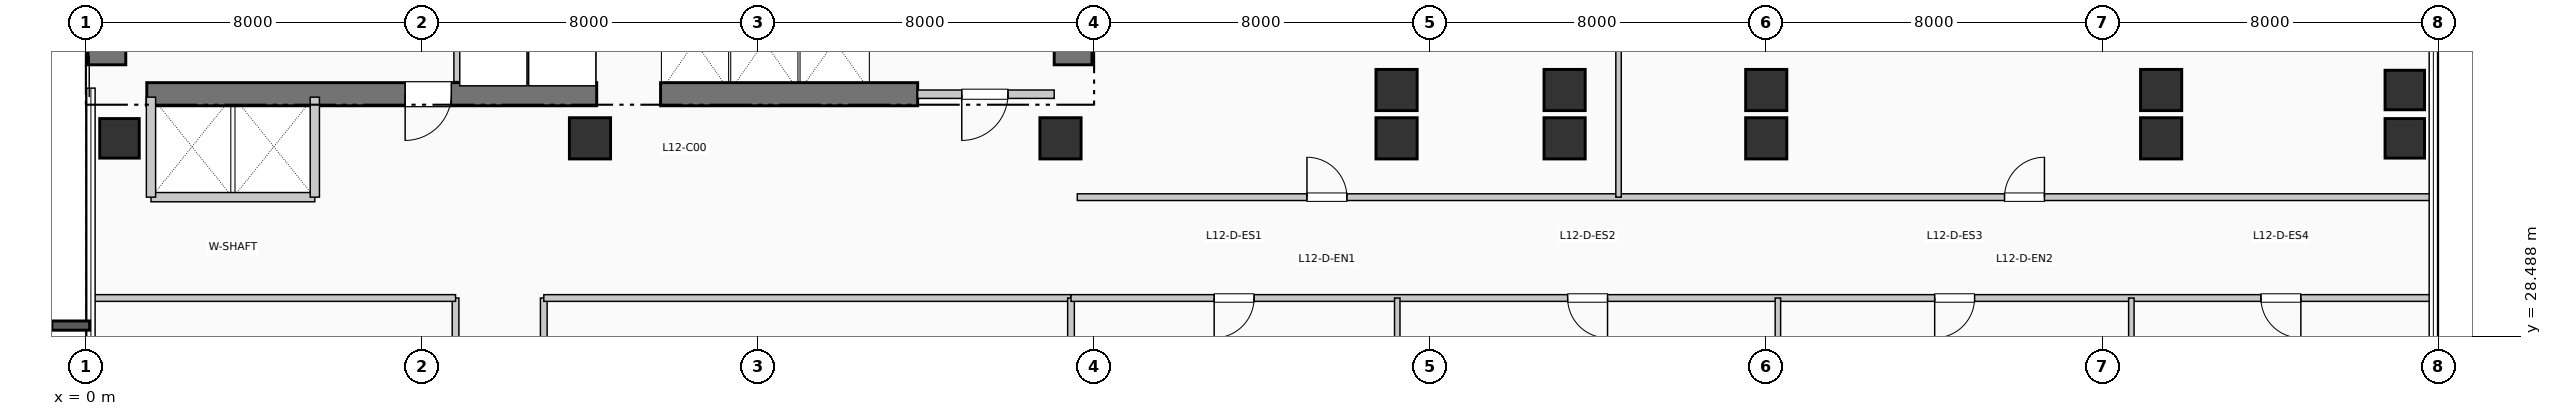
"""IFC4 building model, lengths in metres.
Left out: names, types, materials, properties, quantities, classifications, styles, units other than length and angle.
Written with IfcOpenShell. Run it as: python <this file> out.ifc"""

import sys

from ifc_helpers import new_model, si_unit, direction, frame, frame_2d, origin, origin_2d, place, context, subcontext, project, spatial, rectangle, extrude, element, fill, save


model = new_model("IFC4")
c1 = context("Model", 3, precision=1e-05, world=origin(), true_north=direction((0.0, 1.0)))
c2 = subcontext(c1, "Body", "Model", "MODEL_VIEW")
j1 = project(units=[si_unit("LENGTHUNIT", "METRE"), si_unit("PLANEANGLEUNIT", "RADIAN")], contexts=[c1])
p1 = place(None, origin())
s1 = spatial("IfcSite", under=j1, at=p1, CompositionType="ELEMENT")
p2 = place(p1, origin())
s2 = spatial("IfcBuilding", under=s1, at=p2, CompositionType="ELEMENT")
p3 = place(p2, frame((0.0, 0.0, 54.12)))
s3 = spatial("IfcBuildingStorey", under=s2, at=p3, CompositionType="ELEMENT", Elevation=54.12)
p4 = place(p3, frame((0.5, 34.95, 0.0), z_axis=(0.0, 0.0, 1.0), x_axis=(0.0, 1.0, 0.0)))
e1 = element("IfcWall", 1, at=p4, inside=s3, PredefinedType="SHEAR", context=c2, shape_type="SweptSolid", body=[
    extrude(rectangle(XDim=7.9, YDim=0.9, at=frame_2d((3.95, 0.0))), origin(), (0.0, 0.0, 1.0), 3.96),
])
p5 = place(p3, frame((23.5, 34.95, 0.0), z_axis=(0.0, 0.0, 1.0), x_axis=(0.0, 1.0, 0.0)))
e2 = element("IfcWall", 2, at=p5, inside=s3, PredefinedType="SHEAR", context=c2, shape_type="SweptSolid", body=[
    extrude(rectangle(XDim=10.64, YDim=0.9, at=frame_2d((5.32, 0.0))), origin(), (0.0, 0.0, 1.0), 3.96),
])
p6 = place(p3, frame((1.45, 34.25, 0.0), z_axis=(0.0, 0.0, 1.0), x_axis=(1.0, 0.0, 0.0)))
e3 = element("IfcWall", 3, at=p6, inside=s3, PredefinedType="SHEAR", context=c2, shape_type="SweptSolid", body=[
    extrude(rectangle(XDim=10.71, YDim=0.55, at=frame_2d((5.355, 0.0))), origin(), (0.0, 0.0, 1.0), 3.96),
])
p7 = place(p6, frame((7.25, 0.0, 0.0), z_axis=(0.0, 0.0, 1.0), x_axis=(-1.0, 0.0, 0.0)))
e4 = element("IfcOpeningElement", 4, at=p7, cuts=e3, PredefinedType="OPENING", context=c2, shape_type="SweptSolid", body=[
    extrude(rectangle(XDim=1.1, YDim=2.15, at=frame_2d((0.55, 1.075))), frame((0.0, 0.285, 0.0), z_axis=(0.0, -1.0, 0.0), x_axis=(1.0, 0.0, 0.0)), (0.0, 0.0, 1.0), 0.57),
])
p8 = place(p3, frame((13.68, 34.25, 0.0), z_axis=(0.0, 0.0, 1.0), x_axis=(1.0, 0.0, 0.0)))
e5 = element("IfcWall", 5, at=p8, inside=s3, PredefinedType="SHEAR", context=c2, shape_type="SweptSolid", body=[
    extrude(rectangle(XDim=6.12, YDim=0.55, at=frame_2d((3.06, 0.0))), origin(), (0.0, 0.0, 1.0), 3.96),
])
p9 = place(p3, frame((0.8, 33.2, 0.0), z_axis=(0.0, 0.0, 1.0), x_axis=(1.0, 0.0, 0.0)))
e6 = element("IfcColumn", 6, at=p9, inside=s3, PredefinedType="COLUMN", context=c2, shape_type="SweptSolid", body=[
    extrude(rectangle(XDim=0.94, YDim=0.94, at=origin_2d()), origin(), (0.0, 0.0, 1.0), 3.96),
])
for number, where, z_axis, x_axis in (
    (7, (12.0, 33.2, 0.0), (0.0, 0.0, 1.0), (1.0, 0.0, 0.0)),
    (8, (23.2, 33.2, 0.0), (0.0, 0.0, 1.0), (1.0, 0.0, 0.0)),
    (9, (31.2, 33.2, 0.0), (0.0, 0.0, 1.0), (1.0, 0.0, 0.0)),
    (10, (31.2, 34.35, 0.0), (0.0, 0.0, 1.0), (1.0, 0.0, 0.0)),
    (11, (35.2, 33.2, 0.0), (0.0, 0.0, 1.0), (1.0, 0.0, 0.0)),
    (12, (35.2, 34.35, 0.0), (0.0, 0.0, 1.0), (1.0, 0.0, 0.0)),
    (13, (40.0, 33.2, 0.0), (0.0, 0.0, 1.0), (1.0, 0.0, 0.0)),
    (14, (40.0, 34.35, 0.0), (0.0, 0.0, 1.0), (1.0, 0.0, 0.0)),
    (15, (49.4, 33.2, 0.0), (0.0, 0.0, 1.0), (1.0, 0.0, 0.0)),
    (16, (49.4, 34.35, 0.0), (0.0, 0.0, 1.0), (1.0, 0.0, 0.0)),
):
    element("IfcColumn", number, at=place(p3, frame(where, z_axis=z_axis, x_axis=x_axis)), inside=s3, PredefinedType="COLUMN", context=c2, shape_type="SweptSolid", body=[
        extrude(rectangle(XDim=0.98, YDim=0.98, at=origin_2d()), origin(), (0.0, 0.0, 1.0), 3.96),
    ])
for number, where, z_axis, x_axis in (
    (17, (55.2, 33.2, 0.0), (0.0, 0.0, 1.0), (1.0, 0.0, 0.0)),
    (18, (55.2, 34.35, 0.0), (0.0, 0.0, 1.0), (1.0, 0.0, 0.0)),
):
    element("IfcColumn", number, at=place(p3, frame(where, z_axis=z_axis, x_axis=x_axis)), inside=s3, PredefinedType="COLUMN", context=c2, shape_type="SweptSolid", body=[
        extrude(rectangle(XDim=0.94, YDim=0.94, at=origin_2d()), origin(), (0.0, 0.0, 1.0), 3.96),
    ])
p10 = place(p3, frame((8.86, 34.55, 0.0), z_axis=(0.0, 0.0, 1.0), x_axis=(0.0, 1.0, 0.0)))
e19 = element("IfcWall", 19, at=p10, inside=s3, PredefinedType="PARTITIONING", context=c2, shape_type="SweptSolid", body=[
    extrude(rectangle(XDim=2.5, YDim=0.2, at=frame_2d((1.25, 0.0))), origin(), (0.0, 0.0, 1.0), 3.71),
])
p11 = place(p3, frame((19.8, 34.25, 0.0), z_axis=(0.0, 0.0, 1.0), x_axis=(1.0, 0.0, 0.0)))
e20 = element("IfcWall", 20, at=p11, inside=s3, PredefinedType="PARTITIONING", context=c2, shape_type="SweptSolid", body=[
    extrude(rectangle(XDim=3.25, YDim=0.2, at=frame_2d((1.625, 0.0))), origin(), (0.0, 0.0, 1.0), 3.71),
])
p12 = place(p11, frame((2.15, 0.0, 0.0), z_axis=(0.0, 0.0, 1.0), x_axis=(-1.0, 0.0, 0.0)))
e21 = element("IfcOpeningElement", 21, at=p12, cuts=e20, PredefinedType="OPENING", context=c2, shape_type="SweptSolid", body=[
    extrude(rectangle(XDim=1.1, YDim=2.15, at=frame_2d((0.55, 1.075))), frame((0.0, 0.11, 0.0), z_axis=(0.0, -1.0, 0.0), x_axis=(1.0, 0.0, 0.0)), (0.0, 0.0, 1.0), 0.22),
])
p13 = place(p3, frame((1.55, 31.8, 0.0), z_axis=(0.0, 0.0, 1.0), x_axis=(1.0, 0.0, 0.0)))
e22 = element("IfcWall", 22, at=p13, inside=s3, PredefinedType="PARTITIONING", context=c2, shape_type="SweptSolid", body=[
    extrude(rectangle(XDim=3.9, YDim=0.22, at=frame_2d((1.95, 0.0))), origin(), (0.0, 0.0, 1.0), 3.71),
])
for number, where, z_axis, x_axis in (
    (23, (1.55, 31.8, 0.0), (0.0, 0.0, 1.0), (0.0, 1.0, 0.0)),
    (24, (5.45, 31.8, 0.0), (0.0, 0.0, 1.0), (0.0, 1.0, 0.0)),
):
    element("IfcWall", number, at=place(p3, frame(where, z_axis=z_axis, x_axis=x_axis)), inside=s3, PredefinedType="PARTITIONING", context=c2, shape_type="SweptSolid", body=[
        extrude(rectangle(XDim=2.38, YDim=0.22, at=frame_2d((1.19, 0.0))), origin(), (0.0, 0.0, 1.0), 3.71),
    ])
p14 = place(p3, frame((8.8, 4.5, 0.0), z_axis=(0.0, 0.0, 1.0), x_axis=(0.0, 1.0, 0.0)))
e25 = element("IfcWall", 25, at=p14, inside=s3, PredefinedType="PARTITIONING", context=c2, shape_type="SweptSolid", body=[
    extrude(rectangle(XDim=24.9, YDim=0.16, at=frame_2d((12.45, 0.0))), origin(), (0.0, 0.0, 1.0), 3.71),
])
p15 = place(p14, frame((3.587, 0.0, 0.0), z_axis=(0.0, 0.0, 1.0), x_axis=(-1.0, 0.0, 0.0)))
e26 = element("IfcOpeningElement", 26, at=p15, cuts=e25, PredefinedType="OPENING", context=c2, shape_type="SweptSolid", body=[
    extrude(rectangle(XDim=0.95, YDim=2.15, at=frame_2d((0.475, 1.075))), frame((0.0, 0.09, 0.0), z_axis=(0.0, -1.0, 0.0), x_axis=(1.0, 0.0, 0.0)), (0.0, 0.0, 1.0), 0.18),
])
p16 = place(p14, frame((10.311, 0.0, 0.0), z_axis=(0.0, 0.0, 1.0), x_axis=(-1.0, 0.0, 0.0)))
e27 = element("IfcOpeningElement", 27, at=p16, cuts=e25, PredefinedType="OPENING", context=c2, shape_type="SweptSolid", body=[
    extrude(rectangle(XDim=0.95, YDim=2.15, at=frame_2d((0.475, 1.075))), frame((0.0, 0.09, 0.0), z_axis=(0.0, -1.0, 0.0), x_axis=(1.0, 0.0, 0.0)), (0.0, 0.0, 1.0), 0.18),
])
p17 = place(p14, frame((17.158, 0.0, 0.0), z_axis=(0.0, 0.0, 1.0), x_axis=(-1.0, 0.0, 0.0)))
e28 = element("IfcOpeningElement", 28, at=p17, cuts=e25, PredefinedType="OPENING", context=c2, shape_type="SweptSolid", body=[
    extrude(rectangle(XDim=0.95, YDim=2.15, at=frame_2d((0.475, 1.075))), frame((0.0, 0.09, 0.0), z_axis=(0.0, -1.0, 0.0), x_axis=(1.0, 0.0, 0.0)), (0.0, 0.0, 1.0), 0.18),
])
p18 = place(p14, frame((22.885, 0.0, 0.0), z_axis=(0.0, 0.0, 1.0), x_axis=(-1.0, 0.0, 0.0)))
e29 = element("IfcOpeningElement", 29, at=p18, cuts=e25, PredefinedType="OPENING", context=c2, shape_type="SweptSolid", body=[
    extrude(rectangle(XDim=0.95, YDim=2.15, at=frame_2d((0.475, 1.075))), frame((0.0, 0.09, 0.0), z_axis=(0.0, -1.0, 0.0), x_axis=(1.0, 0.0, 0.0)), (0.0, 0.0, 1.0), 0.18),
])
p19 = place(p3, frame((10.9, 4.5, 0.0), z_axis=(0.0, 0.0, 1.0), x_axis=(0.0, 1.0, 0.0)))
e30 = element("IfcWall", 30, at=p19, inside=s3, PredefinedType="PARTITIONING", context=c2, shape_type="SweptSolid", body=[
    extrude(rectangle(XDim=24.9, YDim=0.16, at=frame_2d((12.45, 0.0))), origin(), (0.0, 0.0, 1.0), 3.71),
])
p20 = place(p19, frame((3.883, 0.0, 0.0)))
e31 = element("IfcOpeningElement", 31, at=p20, cuts=e30, PredefinedType="OPENING", context=c2, shape_type="SweptSolid", body=[
    extrude(rectangle(XDim=0.95, YDim=2.15, at=frame_2d((0.475, 1.075))), frame((0.0, 0.09, 0.0), z_axis=(0.0, -1.0, 0.0), x_axis=(1.0, 0.0, 0.0)), (0.0, 0.0, 1.0), 0.18),
])
p21 = place(p19, frame((12.097, 0.0, 0.0)))
e32 = element("IfcOpeningElement", 32, at=p21, cuts=e30, PredefinedType="OPENING", context=c2, shape_type="SweptSolid", body=[
    extrude(rectangle(XDim=0.95, YDim=2.15, at=frame_2d((0.475, 1.075))), frame((0.0, 0.09, 0.0), z_axis=(0.0, -1.0, 0.0), x_axis=(1.0, 0.0, 0.0)), (0.0, 0.0, 1.0), 0.18),
])
p22 = place(p19, frame((20.69, 0.0, 0.0)))
e33 = element("IfcOpeningElement", 33, at=p22, cuts=e30, PredefinedType="OPENING", context=c2, shape_type="SweptSolid", body=[
    extrude(rectangle(XDim=0.95, YDim=2.15, at=frame_2d((0.475, 1.075))), frame((0.0, 0.09, 0.0), z_axis=(0.0, -1.0, 0.0), x_axis=(1.0, 0.0, 0.0)), (0.0, 0.0, 1.0), 0.18),
])
p23 = place(p3, frame((0.19, 29.4, 0.0), z_axis=(0.0, 0.0, 1.0), x_axis=(1.0, 0.0, 0.0)))
e34 = element("IfcWall", 34, at=p23, inside=s3, PredefinedType="PARTITIONING", context=c2, shape_type="SweptSolid", body=[
    extrude(rectangle(XDim=8.61, YDim=0.16, at=frame_2d((4.305, 0.0))), origin(), (0.0, 0.0, 1.0), 3.365),
])
p24 = place(p3, frame((10.9, 29.4, 0.0), z_axis=(0.0, 0.0, 1.0), x_axis=(1.0, 0.0, 0.0)))
e35 = element("IfcWall", 35, at=p24, inside=s3, PredefinedType="PARTITIONING", context=c2, shape_type="SweptSolid", body=[
    extrude(rectangle(XDim=12.55, YDim=0.16, at=frame_2d((6.275, 0.0))), origin(), (0.0, 0.0, 1.0), 3.365),
])
p25 = place(p3, frame((23.45, 0.19, 0.0), z_axis=(0.0, 0.0, 1.0), x_axis=(0.0, 1.0, 0.0)))
e36 = element("IfcWall", 36, at=p25, inside=s3, PredefinedType="PARTITIONING", context=c2, shape_type="SweptSolid", body=[
    extrude(rectangle(XDim=29.21, YDim=0.16, at=frame_2d((14.605, 0.0))), origin(), (0.0, 0.0, 1.0), 2.995),
])
p26 = place(p3, frame((23.45, 29.4, 0.0), z_axis=(0.0, 0.0, 1.0), x_axis=(1.0, 0.0, 0.0)))
e37 = element("IfcWall", 37, at=p26, inside=s3, PredefinedType="PARTITIONING", context=c2, shape_type="SweptSolid", body=[
    extrude(rectangle(XDim=32.36, YDim=0.16, at=frame_2d((16.18, 0.0))), origin(), (0.0, 0.0, 1.0), 3.365),
])
p27 = place(p26, frame((4.358, 0.0, 0.0), z_axis=(0.0, 0.0, 1.0), x_axis=(-1.0, 0.0, 0.0)))
e38 = element("IfcOpeningElement", 38, at=p27, cuts=e37, PredefinedType="OPENING", context=c2, shape_type="SweptSolid", body=[
    extrude(rectangle(XDim=0.95, YDim=2.15, at=frame_2d((0.475, 1.075))), frame((0.0, 0.09, 0.0), z_axis=(0.0, -1.0, 0.0), x_axis=(1.0, 0.0, 0.0)), (0.0, 0.0, 1.0), 0.18),
])
p28 = place(p26, frame((12.772, 0.0, 0.0), z_axis=(0.0, 0.0, 1.0), x_axis=(-1.0, 0.0, 0.0)))
e39 = element("IfcOpeningElement", 39, at=p28, cuts=e37, PredefinedType="OPENING", context=c2, shape_type="SweptSolid", body=[
    extrude(rectangle(XDim=0.95, YDim=2.15, at=frame_2d((0.475, 1.075))), frame((0.0, 0.09, 0.0), z_axis=(0.0, -1.0, 0.0), x_axis=(1.0, 0.0, 0.0)), (0.0, 0.0, 1.0), 0.18),
])
p29 = place(p26, frame((21.509, 0.0, 0.0), z_axis=(0.0, 0.0, 1.0), x_axis=(-1.0, 0.0, 0.0)))
e40 = element("IfcOpeningElement", 40, at=p29, cuts=e37, PredefinedType="OPENING", context=c2, shape_type="SweptSolid", body=[
    extrude(rectangle(XDim=0.95, YDim=2.15, at=frame_2d((0.475, 1.075))), frame((0.0, 0.09, 0.0), z_axis=(0.0, -1.0, 0.0), x_axis=(1.0, 0.0, 0.0)), (0.0, 0.0, 1.0), 0.18),
])
p30 = place(p26, frame((29.275, 0.0, 0.0), z_axis=(0.0, 0.0, 1.0), x_axis=(-1.0, 0.0, 0.0)))
e41 = element("IfcOpeningElement", 41, at=p30, cuts=e37, PredefinedType="OPENING", context=c2, shape_type="SweptSolid", body=[
    extrude(rectangle(XDim=0.95, YDim=2.15, at=frame_2d((0.475, 1.075))), frame((0.0, 0.09, 0.0), z_axis=(0.0, -1.0, 0.0), x_axis=(1.0, 0.0, 0.0)), (0.0, 0.0, 1.0), 0.18),
])
p31 = place(p3, frame((23.6, 31.8, 0.0), z_axis=(0.0, 0.0, 1.0), x_axis=(1.0, 0.0, 0.0)))
e42 = element("IfcWall", 42, at=p31, inside=s3, PredefinedType="PARTITIONING", context=c2, shape_type="SweptSolid", body=[
    extrude(rectangle(XDim=32.21, YDim=0.16, at=frame_2d((16.105, 0.0))), origin(), (0.0, 0.0, 1.0), 3.71),
])
p32 = place(p31, frame((5.467, 0.0, 0.0)))
e43 = element("IfcOpeningElement", 43, at=p32, cuts=e42, PredefinedType="OPENING", context=c2, shape_type="SweptSolid", body=[
    extrude(rectangle(XDim=0.95, YDim=2.15, at=frame_2d((0.475, 1.075))), frame((0.0, 0.09, 0.0), z_axis=(0.0, -1.0, 0.0), x_axis=(1.0, 0.0, 0.0)), (0.0, 0.0, 1.0), 0.18),
])
p33 = place(p31, frame((22.072, 0.0, 0.0)))
e44 = element("IfcOpeningElement", 44, at=p33, cuts=e42, PredefinedType="OPENING", context=c2, shape_type="SweptSolid", body=[
    extrude(rectangle(XDim=0.95, YDim=2.15, at=frame_2d((0.475, 1.075))), frame((0.0, 0.09, 0.0), z_axis=(0.0, -1.0, 0.0), x_axis=(1.0, 0.0, 0.0)), (0.0, 0.0, 1.0), 0.18),
])
for number, where, z_axis, x_axis in (
    (45, (31.216, 18.19, 0.0), (0.0, 0.0, 1.0), (0.0, 1.0, 0.0)),
    (46, (40.277, 18.19, 0.0), (0.0, 0.0, 1.0), (0.0, 1.0, 0.0)),
):
    element("IfcWall", number, at=place(p3, frame(where, z_axis=z_axis, x_axis=x_axis)), inside=s3, PredefinedType="PARTITIONING", context=c2, shape_type="SweptSolid", body=[
        extrude(rectangle(XDim=11.21, YDim=0.13, at=frame_2d((5.605, 0.0))), origin(), (0.0, 0.0, 1.0), 2.995),
    ])
p34 = place(p3, frame((48.691, 18.19, 0.0), z_axis=(0.0, 0.0, 1.0), x_axis=(0.0, 1.0, 0.0)))
e47 = element("IfcWall", 47, at=p34, inside=s3, PredefinedType="PARTITIONING", context=c2, shape_type="SweptSolid", body=[
    extrude(rectangle(XDim=11.21, YDim=0.13, at=frame_2d((5.605, 0.0))), origin(), (0.0, 0.0, 1.0), 3.71),
])
p35 = place(p3, frame((36.484, 31.8, 0.0), z_axis=(0.0, 0.0, 1.0), x_axis=(0.0, 1.0, 0.0)))
e48 = element("IfcWall", 48, at=p35, inside=s3, PredefinedType="PARTITIONING", context=c2, shape_type="SweptSolid", body=[
    extrude(rectangle(XDim=14.01, YDim=0.13, at=frame_2d((7.005, 0.0))), origin(), (0.0, 0.0, 1.0), 3.71),
])
p36 = place(p7, origin())
e49 = element("IfcDoor", 49, at=p36, inside=s3, OperationType="SINGLE_SWING_LEFT", PredefinedType="DOOR", context=c2, shape_type="SweptSolid", body=[
    extrude(rectangle(XDim=1.1, YDim=2.15, at=frame_2d((0.55, 1.075))), frame((0.0, 0.025, 0.0), z_axis=(0.0, -1.0, 0.0), x_axis=(1.0, 0.0, 0.0)), (0.0, 0.0, 1.0), 0.05),
])
fill(e4, e49)
p37 = place(p12, origin())
e50 = element("IfcDoor", 50, at=p37, inside=s3, OperationType="SINGLE_SWING_LEFT", PredefinedType="DOOR", context=c2, shape_type="SweptSolid", body=[
    extrude(rectangle(XDim=1.1, YDim=2.15, at=frame_2d((0.55, 1.075))), frame((0.0, 0.025, 0.0), z_axis=(0.0, -1.0, 0.0), x_axis=(1.0, 0.0, 0.0)), (0.0, 0.0, 1.0), 0.05),
])
fill(e21, e50)
p38 = place(p27, origin())
e51 = element("IfcDoor", 51, at=p38, inside=s3, OperationType="SINGLE_SWING_LEFT", PredefinedType="DOOR", context=c2, shape_type="SweptSolid", body=[
    extrude(rectangle(XDim=0.95, YDim=2.15, at=frame_2d((0.475, 1.075))), frame((0.0, 0.025, 0.0), z_axis=(0.0, -1.0, 0.0), x_axis=(1.0, 0.0, 0.0)), (0.0, 0.0, 1.0), 0.05),
])
fill(e38, e51)
p39 = place(p28, origin())
e52 = element("IfcDoor", 52, at=p39, inside=s3, OperationType="SINGLE_SWING_RIGHT", PredefinedType="DOOR", context=c2, shape_type="SweptSolid", body=[
    extrude(rectangle(XDim=0.95, YDim=2.15, at=frame_2d((0.475, 1.075))), frame((0.0, 0.025, 0.0), z_axis=(0.0, -1.0, 0.0), x_axis=(1.0, 0.0, 0.0)), (0.0, 0.0, 1.0), 0.05),
])
fill(e39, e52)
p40 = place(p29, origin())
e53 = element("IfcDoor", 53, at=p40, inside=s3, OperationType="SINGLE_SWING_LEFT", PredefinedType="DOOR", context=c2, shape_type="SweptSolid", body=[
    extrude(rectangle(XDim=0.95, YDim=2.15, at=frame_2d((0.475, 1.075))), frame((0.0, 0.025, 0.0), z_axis=(0.0, -1.0, 0.0), x_axis=(1.0, 0.0, 0.0)), (0.0, 0.0, 1.0), 0.05),
])
fill(e40, e53)
p41 = place(p30, origin())
e54 = element("IfcDoor", 54, at=p41, inside=s3, OperationType="SINGLE_SWING_RIGHT", PredefinedType="DOOR", context=c2, shape_type="SweptSolid", body=[
    extrude(rectangle(XDim=0.95, YDim=2.15, at=frame_2d((0.475, 1.075))), frame((0.0, 0.025, 0.0), z_axis=(0.0, -1.0, 0.0), x_axis=(1.0, 0.0, 0.0)), (0.0, 0.0, 1.0), 0.05),
])
fill(e41, e54)
p42 = place(p32, origin())
e55 = element("IfcDoor", 55, at=p42, inside=s3, OperationType="SINGLE_SWING_LEFT", PredefinedType="DOOR", context=c2, shape_type="SweptSolid", body=[
    extrude(rectangle(XDim=0.95, YDim=2.15, at=frame_2d((0.475, 1.075))), frame((0.0, 0.025, 0.0), z_axis=(0.0, -1.0, 0.0), x_axis=(1.0, 0.0, 0.0)), (0.0, 0.0, 1.0), 0.05),
])
fill(e43, e55)
p43 = place(p33, origin())
e56 = element("IfcDoor", 56, at=p43, inside=s3, OperationType="SINGLE_SWING_RIGHT", PredefinedType="DOOR", context=c2, shape_type="SweptSolid", body=[
    extrude(rectangle(XDim=0.95, YDim=2.15, at=frame_2d((0.475, 1.075))), frame((0.0, 0.025, 0.0), z_axis=(0.0, -1.0, 0.0), x_axis=(1.0, 0.0, 0.0)), (0.0, 0.0, 1.0), 0.05),
])
fill(e44, e56)
save(model, sys.argv[1])
